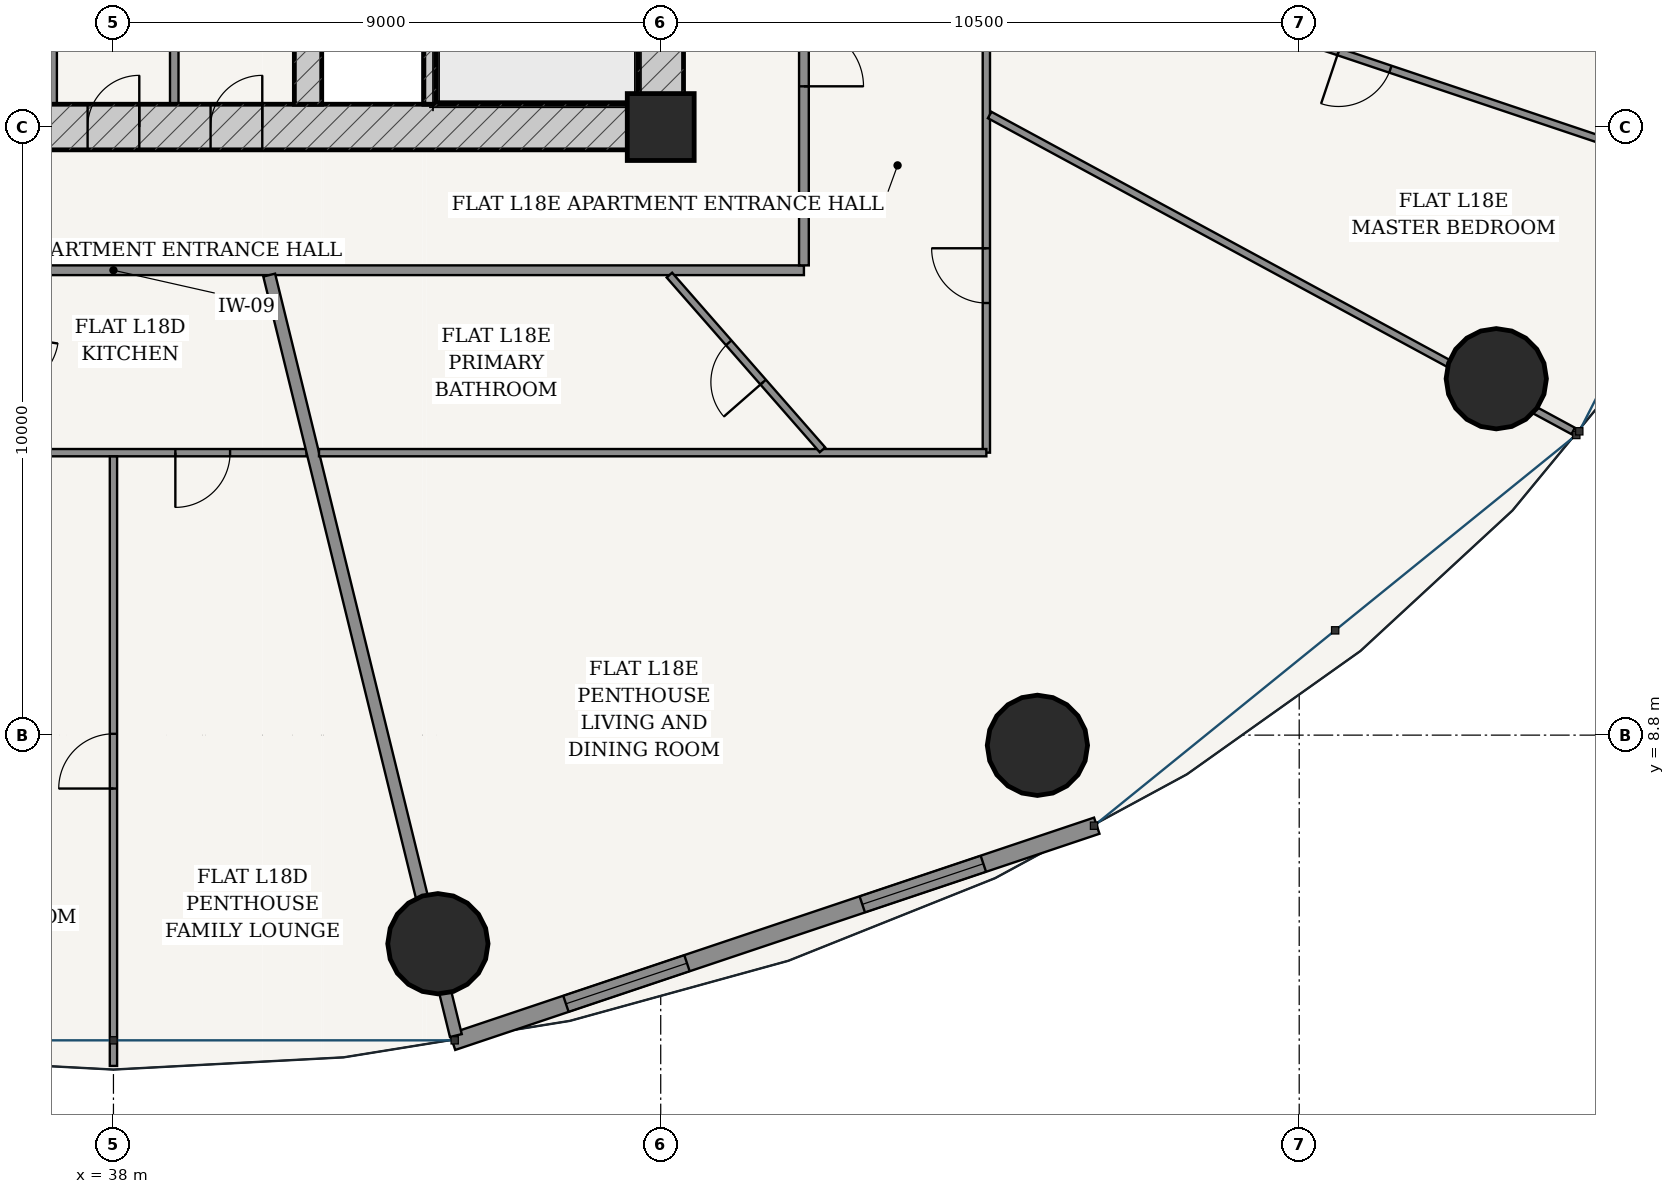
"""IFC4 building model, lengths in metres.
Left out: names, types, materials, properties, quantities, classifications, styles, units other than length and angle.
Written with IfcOpenShell. Run it as: python <this file> out.ifc"""

import sys

from ifc_helpers import new_model, si_unit, direction, frame, frame_2d, origin, origin_2d, place, context, subcontext, project, spatial, rectangle, hollow_circle, extrude, source, transform, mapped, element, fill, save


model = new_model("IFC4")
c1 = context("Model", 3, precision=1e-05, world=origin(), true_north=direction((-0.2419218956, 0.970295726276)))
c2 = subcontext(c1, "Body", "Model", "MODEL_VIEW")
j1 = project(units=[si_unit("LENGTHUNIT", "METRE"), si_unit("PLANEANGLEUNIT", "RADIAN")], contexts=[c1])
p1 = place(None, origin())
s1 = spatial("IfcSite", under=j1, at=p1, CompositionType="ELEMENT")
p2 = place(p1, origin())
s2 = spatial("IfcBuilding", under=s1, at=p2, CompositionType="ELEMENT")
p3 = place(p2, frame((0.0, 0.0, 70.8)))
s3 = spatial("IfcBuildingStorey", under=s2, at=p3, CompositionType="ELEMENT", Elevation=70.8)
p4 = place(p3, frame((47.0, 18.8, 0.0), z_axis=(0.0, 0.0, 1.0), x_axis=(1.0, 0.0, 0.0)))
e1 = element("IfcColumn", 1, at=p4, inside=s3, PredefinedType="COLUMN", context=c2, shape_type="SweptSolid", body=[
    extrude(rectangle(XDim=1.1, YDim=1.1, at=origin_2d()), origin(), (0.0, 0.0, 1.0), 3.6),
])
p5 = place(p3, frame((28.625, 18.8, 0.0), z_axis=(0.0, 0.0, 1.0), x_axis=(1.0, 0.0, 0.0)))
e2 = element("IfcWall", 2, at=p5, inside=s3, PredefinedType="SHEAR", context=c2, shape_type="SweptSolid", body=[
    extrude(rectangle(XDim=18.75, YDim=0.75, at=frame_2d((9.375, 0.0))), origin(), (0.0, 0.0, 1.0), 3.15),
])
p6 = place(p5, frame((6.927, 0.0, 0.0)))
e3 = element("IfcOpeningElement", 3, at=p6, cuts=e2, PredefinedType="OPENING", context=c2, shape_type="SweptSolid", body=[
    extrude(rectangle(XDim=0.85, YDim=2.1, at=frame_2d((0.425, 1.05))), frame((0.0, 0.385, 0.0), z_axis=(0.0, -1.0, 0.0), x_axis=(1.0, 0.0, 0.0)), (0.0, 0.0, 1.0), 0.77),
])
p7 = place(p5, frame((8.95, 0.0, 0.0)))
e4 = element("IfcOpeningElement", 4, at=p7, cuts=e2, PredefinedType="OPENING", context=c2, shape_type="SweptSolid", body=[
    extrude(rectangle(XDim=0.85, YDim=2.1, at=frame_2d((0.425, 1.05))), frame((0.0, 0.385, 0.0), z_axis=(0.0, -1.0, 0.0), x_axis=(1.0, 0.0, 0.0)), (0.0, 0.0, 1.0), 0.77),
])
p8 = place(p5, frame((10.972, 0.0, 0.0)))
e5 = element("IfcOpeningElement", 5, at=p8, cuts=e2, PredefinedType="OPENING", context=c2, shape_type="SweptSolid", body=[
    extrude(rectangle(XDim=0.85, YDim=2.1, at=frame_2d((0.425, 1.05))), frame((0.0, 0.385, 0.0), z_axis=(0.0, -1.0, 0.0), x_axis=(1.0, 0.0, 0.0)), (0.0, 0.0, 1.0), 0.77),
])
p9 = place(p3, frame((47.0, 19.175, 0.0), z_axis=(0.0, 0.0, 1.0), x_axis=(0.0, 1.0, 0.0)))
e6 = element("IfcWall", 6, at=p9, inside=s3, PredefinedType="SHEAR", context=c2, shape_type="SweptSolid", body=[
    extrude(rectangle(XDim=15.25, YDim=0.75, at=frame_2d((7.625, 0.0))), origin(), (0.0, 0.0, 1.0), 3.15),
])
p10 = place(p9, frame((9.875, 0.0, 0.0)))
e7 = element("IfcOpeningElement", 7, at=p10, cuts=e6, PredefinedType="OPENING", context=c2, shape_type="SweptSolid", body=[
    extrude(rectangle(XDim=1.5, YDim=2.2, at=frame_2d((0.75, 1.1))), frame((0.0, 0.385, 0.0), z_axis=(0.0, -1.0, 0.0), x_axis=(1.0, 0.0, 0.0)), (0.0, 0.0, 1.0), 0.77),
])
p11 = place(p3, frame((43.205, 19.175, 0.0), z_axis=(0.0, 0.0, 1.0), x_axis=(0.0, 1.0, 0.0)))
e8 = element("IfcWall", 8, at=p11, inside=s3, PredefinedType="SOLIDWALL", context=c2, shape_type="SweptSolid", body=[
    extrude(rectangle(XDim=7.375, YDim=0.2, at=frame_2d((3.688, 0.0))), origin(), (0.0, 0.0, 1.0), 3.15),
])
p12 = place(p3, frame((41.2, 19.175, 0.0), z_axis=(0.0, 0.0, 1.0), x_axis=(0.0, 1.0, 0.0)))
e9 = element("IfcWall", 9, at=p12, inside=s3, PredefinedType="SHEAR", context=c2, shape_type="SweptSolid", body=[
    extrude(rectangle(XDim=15.25, YDim=0.45, at=frame_2d((7.625, 0.0))), origin(), (0.0, 0.0, 1.0), 3.15),
])
p13 = place(p12, frame((7.8, 0.0, 0.0)))
e10 = element("IfcOpeningElement", 10, at=p13, cuts=e9, PredefinedType="OPENING", context=c2, shape_type="SweptSolid", body=[
    extrude(rectangle(XDim=1.05, YDim=2.15, at=frame_2d((0.525, 1.075))), frame((0.0, 0.235, 0.0), z_axis=(0.0, -1.0, 0.0), x_axis=(1.0, 0.0, 0.0)), (0.0, 0.0, 1.0), 0.47),
])
for number, where, z_axis, x_axis in (
    (11, (43.336, 5.37, 0.0), (0.0, 0.0, 1.0), (1.0, 0.0, 0.0)),
    (12, (53.195, 8.632, 0.0), (0.0, 0.0, 1.0), (1.0, 0.0, 0.0)),
    (13, (60.741, 14.661, 0.0), (0.0, 0.0, 1.0), (1.0, 0.0, 0.0)),
):
    element("IfcColumn", number, at=place(p3, frame(where, z_axis=z_axis, x_axis=x_axis)), inside=s3, PredefinedType="COLUMN", context=c2, shape_type="SweptSolid", body=[
        extrude(hollow_circle(Radius=0.825, WallThickness=0.05, at=origin_2d()), origin(), (0.0, 0.0, 1.0), 3.6),
    ])
p14 = place(p3, frame((43.576, 3.756, 0.0), z_axis=(0.0, 0.0, 1.0), x_axis=(0.948047847546, 0.31812777113, 0.0)))
e14 = element("IfcWall", 14, at=p14, inside=s3, PredefinedType="SOLIDWALL", context=c2, shape_type="SweptSolid", body=[
    extrude(rectangle(XDim=11.175, YDim=0.28, at=frame_2d((5.588, 0.0))), origin(), (0.0, 0.0, 1.0), 3.15),
])
p15 = place(p14, frame((1.967, 0.0, 0.85)))
e15 = element("IfcOpeningElement", 15, at=p15, cuts=e14, PredefinedType="OPENING", context=c2, shape_type="SweptSolid", body=[
    extrude(rectangle(XDim=2.1, YDim=1.95, at=frame_2d((1.05, 0.975))), frame((0.0, 0.15, 0.0), z_axis=(0.0, -1.0, 0.0), x_axis=(1.0, 0.0, 0.0)), (0.0, 0.0, 1.0), 0.3),
])
p16 = place(p14, frame((7.108, 0.0, 0.85)))
e16 = element("IfcOpeningElement", 16, at=p16, cuts=e14, PredefinedType="OPENING", context=c2, shape_type="SweptSolid", body=[
    extrude(rectangle(XDim=2.1, YDim=1.95, at=frame_2d((1.05, 0.975))), frame((0.0, 0.15, 0.0), z_axis=(0.0, -1.0, 0.0), x_axis=(1.0, 0.0, 0.0)), (0.0, 0.0, 1.0), 0.3),
])
p17 = place(p3, frame((37.0, 19.175, 0.0), z_axis=(0.0, 0.0, 1.0), x_axis=(0.0, 1.0, 0.0)))
e17 = element("IfcWall", 17, at=p17, inside=s3, PredefinedType="PARTITIONING", context=c2, shape_type="SweptSolid", body=[
    extrude(rectangle(XDim=4.465, YDim=0.14, at=frame_2d((2.232, 0.0))), origin(), (0.0, 0.0, 1.0), 3.15),
])
p18 = place(p17, frame((1.808, 0.0, 0.0)))
e18 = element("IfcOpeningElement", 18, at=p18, cuts=e17, PredefinedType="OPENING", context=c2, shape_type="SweptSolid", body=[
    extrude(rectangle(XDim=0.85, YDim=2.1, at=frame_2d((0.425, 1.05))), frame((0.0, 0.08, 0.0), z_axis=(0.0, -1.0, 0.0), x_axis=(1.0, 0.0, 0.0)), (0.0, 0.0, 1.0), 0.16),
])
p19 = place(p3, frame((39.0, 19.175, 0.0), z_axis=(0.0, 0.0, 1.0), x_axis=(0.0, 1.0, 0.0)))
e19 = element("IfcWall", 19, at=p19, inside=s3, PredefinedType="PARTITIONING", context=c2, shape_type="SweptSolid", body=[
    extrude(rectangle(XDim=4.465, YDim=0.14, at=frame_2d((2.232, 0.0))), origin(), (0.0, 0.0, 1.0), 3.15),
])
p20 = place(p19, frame((1.808, 0.0, 0.0)))
e20 = element("IfcOpeningElement", 20, at=p20, cuts=e19, PredefinedType="OPENING", context=c2, shape_type="SweptSolid", body=[
    extrude(rectangle(XDim=0.85, YDim=2.1, at=frame_2d((0.425, 1.05))), frame((0.0, 0.08, 0.0), z_axis=(0.0, -1.0, 0.0), x_axis=(1.0, 0.0, 0.0)), (0.0, 0.0, 1.0), 0.16),
])
p21 = place(p3, frame((26.645, 16.445, 0.0), z_axis=(0.0, 0.0, 1.0), x_axis=(1.0, 0.0, 0.0)))
e21 = element("IfcWall", 21, at=p21, inside=s3, PredefinedType="PARTITIONING", context=c2, shape_type="SweptSolid", body=[
    extrude(rectangle(XDim=22.71, YDim=0.16, at=frame_2d((11.355, 0.0))), origin(), (0.0, 0.0, 1.0), 2.596),
])
p22 = place(p21, frame((5.419, 0.0, 0.0)))
e22 = element("IfcOpeningElement", 22, at=p22, cuts=e21, PredefinedType="OPENING", context=c2, shape_type="SweptSolid", body=[
    extrude(rectangle(XDim=0.98, YDim=2.2, at=frame_2d((0.49, 1.1))), frame((0.0, 0.09, 0.0), z_axis=(0.0, -1.0, 0.0), x_axis=(1.0, 0.0, 0.0)), (0.0, 0.0, 1.0), 0.18),
])
p23 = place(p3, frame((49.355, 16.525, 0.0), z_axis=(0.0, 0.0, 1.0), x_axis=(0.0, 1.0, 0.0)))
e23 = element("IfcWall", 23, at=p23, inside=s3, PredefinedType="PARTITIONING", context=c2, shape_type="SweptSolid", body=[
    extrude(rectangle(XDim=20.55, YDim=0.16, at=frame_2d((10.275, 0.0))), origin(), (0.0, 0.0, 1.0), 2.596),
])
p24 = place(p23, frame((16.537, 0.0, 0.0)))
e24 = element("IfcOpeningElement", 24, at=p24, cuts=e23, PredefinedType="OPENING", context=c2, shape_type="SweptSolid", body=[
    extrude(rectangle(XDim=0.98, YDim=2.2, at=frame_2d((0.49, 1.1))), frame((0.0, 0.09, 0.0), z_axis=(0.0, -1.0, 0.0), x_axis=(1.0, 0.0, 0.0)), (0.0, 0.0, 1.0), 0.18),
])
p25 = place(p23, frame((2.945, 0.0, 0.0)))
e25 = element("IfcOpeningElement", 25, at=p25, cuts=e23, PredefinedType="OPENING", context=c2, shape_type="SweptSolid", body=[
    extrude(rectangle(XDim=0.98, YDim=2.2, at=frame_2d((0.49, 1.1))), frame((0.0, 0.09, 0.0), z_axis=(0.0, -1.0, 0.0), x_axis=(1.0, 0.0, 0.0)), (0.0, 0.0, 1.0), 0.18),
])
p26 = place(p3, frame((41.176, 13.445, 0.0), z_axis=(0.0, 0.0, 1.0), x_axis=(-1.0, 0.0, 0.0)))
e26 = element("IfcWall", 26, at=p26, inside=s3, PredefinedType="PARTITIONING", context=c2, shape_type="SweptSolid", body=[
    extrude(rectangle(XDim=17.531, YDim=0.12, at=frame_2d((8.766, 0.0))), origin(), (0.0, 0.0, 1.0), 2.596),
])
p27 = place(p26, frame((10.299, 0.0, 0.0)))
e27 = element("IfcOpeningElement", 27, at=p27, cuts=e26, PredefinedType="OPENING", context=c2, shape_type="SweptSolid", body=[
    extrude(rectangle(XDim=0.9, YDim=2.15, at=frame_2d((0.45, 1.075))), frame((0.0, 0.07, 0.0), z_axis=(0.0, -1.0, 0.0), x_axis=(1.0, 0.0, 0.0)), (0.0, 0.0, 1.0), 0.14),
])
p28 = place(p26, frame((1.258, 0.0, 0.0)))
e28 = element("IfcOpeningElement", 28, at=p28, cuts=e26, PredefinedType="OPENING", context=c2, shape_type="SweptSolid", body=[
    extrude(rectangle(XDim=0.9, YDim=2.15, at=frame_2d((0.45, 1.075))), frame((0.0, 0.07, 0.0), z_axis=(0.0, -1.0, 0.0), x_axis=(1.0, 0.0, 0.0)), (0.0, 0.0, 1.0), 0.14),
])
p29 = place(p3, frame((38.0, 13.383, 0.0), z_axis=(0.0, 0.0, 1.0), x_axis=(0.0, -1.0, 0.0)))
e29 = element("IfcWall", 29, at=p29, inside=s3, PredefinedType="PARTITIONING", context=c2, shape_type="SweptSolid", body=[
    extrude(rectangle(XDim=10.023, YDim=0.12, at=frame_2d((5.011, 0.0))), origin(), (0.0, 0.0, 1.0), 2.666),
])
p30 = place(p29, frame((4.562, 0.0, 0.0)))
e30 = element("IfcOpeningElement", 30, at=p30, cuts=e29, PredefinedType="OPENING", context=c2, shape_type="SweptSolid", body=[
    extrude(rectangle(XDim=0.9, YDim=2.15, at=frame_2d((0.45, 1.075))), frame((0.0, 0.07, 0.0), z_axis=(0.0, -1.0, 0.0), x_axis=(1.0, 0.0, 0.0)), (0.0, 0.0, 1.0), 0.14),
])
p31 = place(p3, frame((40.562, 16.365, 0.0), z_axis=(0.0, 0.0, 1.0), x_axis=(0.238380116209, -0.971171931326, 0.0)))
e31 = element("IfcWall", 31, at=p31, inside=s3, PredefinedType="PARTITIONING", context=c2, shape_type="SweptSolid", body=[
    extrude(rectangle(XDim=12.877, YDim=0.2, at=frame_2d((6.438, 0.0))), origin(), (0.0, 0.0, 1.0), 2.5),
])
p32 = place(p3, frame((52.355, 26.698, 0.0), z_axis=(0.0, 0.0, 1.0), x_axis=(0.0, -1.0, 0.0)))
e32 = element("IfcWall", 32, at=p32, inside=s3, PredefinedType="PARTITIONING", context=c2, shape_type="SweptSolid", body=[
    extrude(rectangle(XDim=13.253, YDim=0.12, at=frame_2d((6.626, 0.0))), origin(), (0.0, 0.0, 1.0), 2.596),
])
p33 = place(p32, frame((9.892, 0.0, 0.0)))
e33 = element("IfcOpeningElement", 33, at=p33, cuts=e32, PredefinedType="OPENING", context=c2, shape_type="SweptSolid", body=[
    extrude(rectangle(XDim=0.9, YDim=2.15, at=frame_2d((0.45, 1.075))), frame((0.0, 0.07, 0.0), z_axis=(0.0, -1.0, 0.0), x_axis=(1.0, 0.0, 0.0)), (0.0, 0.0, 1.0), 0.14),
])
p34 = place(p32, frame((2.951, 0.0, 0.0)))
e34 = element("IfcOpeningElement", 34, at=p34, cuts=e32, PredefinedType="OPENING", context=c2, shape_type="SweptSolid", body=[
    extrude(rectangle(XDim=0.9, YDim=2.15, at=frame_2d((0.45, 1.075))), frame((0.0, 0.07, 0.0), z_axis=(0.0, -1.0, 0.0), x_axis=(1.0, 0.0, 0.0)), (0.0, 0.0, 1.0), 0.14),
])
p35 = place(p3, frame((52.355, 13.445, 0.0), z_axis=(0.0, 0.0, 1.0), x_axis=(-1.0, 0.0, 0.0)))
e35 = element("IfcWall", 35, at=p35, inside=s3, PredefinedType="PARTITIONING", context=c2, shape_type="SweptSolid", body=[
    extrude(rectangle(XDim=10.975, YDim=0.12, at=frame_2d((5.487, 0.0))), origin(), (0.0, 0.0, 1.0), 2.596),
])
p36 = place(p3, frame((52.409, 18.998, 0.0), z_axis=(0.0, 0.0, 1.0), x_axis=(0.879373936002, -0.476131789193, 0.0)))
e36 = element("IfcWall", 36, at=p36, inside=s3, PredefinedType="PARTITIONING", context=c2, shape_type="SweptSolid", body=[
    extrude(rectangle(XDim=10.913, YDim=0.12, at=frame_2d((5.456, 0.0))), origin(), (0.0, 0.0, 1.0), 2.5),
])
p37 = place(p3, frame((52.414, 21.962, 0.0), z_axis=(0.0, 0.0, 1.0), x_axis=(0.948021751459, -0.318205529118, 0.0)))
e37 = element("IfcWall", 37, at=p37, inside=s3, PredefinedType="PARTITIONING", context=c2, shape_type="SweptSolid", body=[
    extrude(rectangle(XDim=12.994, YDim=0.12, at=frame_2d((6.497, 0.0))), origin(), (0.0, 0.0, 1.0), 2.666),
])
p38 = place(p37, frame((6.047, 0.0, 0.0)))
e38 = element("IfcOpeningElement", 38, at=p38, cuts=e37, PredefinedType="OPENING", context=c2, shape_type="SweptSolid", body=[
    extrude(rectangle(XDim=0.9, YDim=2.15, at=frame_2d((0.45, 1.075))), frame((0.0, 0.07, 0.0), z_axis=(0.0, -1.0, 0.0), x_axis=(1.0, 0.0, 0.0)), (0.0, 0.0, 1.0), 0.14),
])
p39 = place(p3, frame((47.143, 16.365, 0.0), z_axis=(0.0, 0.0, 1.0), x_axis=(0.659015717138, -0.752129167474, 0.0)))
e39 = element("IfcWall", 39, at=p39, inside=s3, PredefinedType="PARTITIONING", context=c2, shape_type="SweptSolid", body=[
    extrude(rectangle(XDim=3.82, YDim=0.12, at=frame_2d((1.91, 0.0))), origin(), (0.0, 0.0, 1.0), 2.825),
])
p40 = place(p39, frame((1.48, 0.0, 0.0)))
e40 = element("IfcOpeningElement", 40, at=p40, cuts=e39, PredefinedType="OPENING", context=c2, shape_type="SweptSolid", body=[
    extrude(rectangle(XDim=0.86, YDim=2.15, at=frame_2d((0.43, 1.075))), frame((0.0, 0.07, 0.0), z_axis=(0.0, -1.0, 0.0), x_axis=(1.0, 0.0, 0.0)), (0.0, 0.0, 1.0), 0.14),
])
m1 = source(origin(), c2, "Body", "SweptSolid", [
    extrude(rectangle(XDim=2.1, YDim=1.95, at=frame_2d((1.05, 0.975))), frame((0.0, 0.03, 0.0), z_axis=(0.0, -1.0, 0.0), x_axis=(1.0, 0.0, 0.0)), (0.0, 0.0, 1.0), 0.06),
])
p41 = place(p15, origin())
e41 = element("IfcWindow", 41, at=p41, inside=s3, PartitioningType="SINGLE_PANEL", PredefinedType="WINDOW", context=c2, shape_type="MappedRepresentation", body=[
    mapped(m1, transform((0.0, 0.0, 0.0), scale=1.0)),
])
fill(e15, e41)
p42 = place(p16, origin())
e42 = element("IfcWindow", 42, at=p42, inside=s3, PartitioningType="SINGLE_PANEL", PredefinedType="WINDOW", context=c2, shape_type="MappedRepresentation", body=[
    mapped(m1, transform((0.0, 0.0, 0.0), scale=1.0)),
])
fill(e16, e42)
m2 = source(origin(), c2, "Body", "SweptSolid", [
    extrude(rectangle(XDim=0.85, YDim=2.1, at=frame_2d((0.425, 1.05))), frame((0.0, 0.025, 0.0), z_axis=(0.0, -1.0, 0.0), x_axis=(1.0, 0.0, 0.0)), (0.0, 0.0, 1.0), 0.05),
])
p43 = place(p7, origin())
e43 = element("IfcDoor", 43, at=p43, inside=s3, OperationType="SINGLE_SWING_RIGHT", PredefinedType="DOOR", context=c2, shape_type="MappedRepresentation", body=[
    mapped(m2, transform((0.0, 0.0, 0.0), scale=1.0)),
])
fill(e4, e43)
p44 = place(p8, origin())
e44 = element("IfcDoor", 44, at=p44, inside=s3, OperationType="SINGLE_SWING_RIGHT", PredefinedType="DOOR", context=c2, shape_type="MappedRepresentation", body=[
    mapped(m2, transform((0.0, 0.0, 0.0), scale=1.0)),
])
fill(e5, e44)
m3 = source(origin(), c2, "Body", "SweptSolid", [
    extrude(rectangle(XDim=0.9, YDim=2.15, at=frame_2d((0.45, 1.075))), frame((0.0, 0.025, 0.0), z_axis=(0.0, -1.0, 0.0), x_axis=(1.0, 0.0, 0.0)), (0.0, 0.0, 1.0), 0.05),
])
p45 = place(p28, origin())
e45 = element("IfcDoor", 45, at=p45, inside=s3, OperationType="SINGLE_SWING_RIGHT", PredefinedType="DOOR", context=c2, shape_type="MappedRepresentation", body=[
    mapped(m3, transform((0.0, 0.0, 0.0), scale=1.0)),
])
fill(e28, e45)
p46 = place(p30, frame((0.9, 0.0, 0.0), z_axis=(0.0, 0.0, 1.0), x_axis=(-1.0, 0.0, 0.0)))
e46 = element("IfcDoor", 46, at=p46, inside=s3, OperationType="SINGLE_SWING_LEFT", PredefinedType="DOOR", context=c2, shape_type="MappedRepresentation", body=[
    mapped(m3, transform((0.0, 0.0, 0.0), scale=1.0)),
])
fill(e30, e46)
m4 = source(origin(), c2, "Body", "SweptSolid", [
    extrude(rectangle(XDim=0.98, YDim=2.2, at=frame_2d((0.49, 1.1))), frame((0.0, 0.025, 0.0), z_axis=(0.0, -1.0, 0.0), x_axis=(1.0, 0.0, 0.0)), (0.0, 0.0, 1.0), 0.05),
])
p47 = place(p25, frame((0.98, 0.0, 0.0), z_axis=(0.0, 0.0, 1.0), x_axis=(-1.0, 0.0, 0.0)))
e47 = element("IfcDoor", 47, at=p47, inside=s3, OperationType="SINGLE_SWING_RIGHT", PredefinedType="DOOR", context=c2, shape_type="MappedRepresentation", body=[
    mapped(m4, transform((0.0, 0.0, 0.0), scale=1.0)),
])
fill(e25, e47)
m5 = source(origin(), c2, "Body", "SweptSolid", [
    extrude(rectangle(XDim=0.86, YDim=2.15, at=frame_2d((0.43, 1.075))), frame((0.0, 0.025, 0.0), z_axis=(0.0, -1.0, 0.0), x_axis=(1.0, 0.0, 0.0)), (0.0, 0.0, 1.0), 0.05),
])
p48 = place(p40, frame((0.86, 0.0, 0.0), z_axis=(0.0, 0.0, 1.0), x_axis=(-1.0, 0.0, 0.0)))
e48 = element("IfcDoor", 48, at=p48, inside=s3, OperationType="SINGLE_SWING_LEFT", PredefinedType="DOOR", context=c2, shape_type="MappedRepresentation", body=[
    mapped(m5, transform((0.0, 0.0, 0.0), scale=1.0)),
])
fill(e40, e48)
p49 = place(p33, frame((0.9, 0.0, 0.0), z_axis=(0.0, 0.0, 1.0), x_axis=(-1.0, 0.0, 0.0)))
e49 = element("IfcDoor", 49, at=p49, inside=s3, OperationType="SINGLE_SWING_RIGHT", PredefinedType="DOOR", context=c2, shape_type="MappedRepresentation", body=[
    mapped(m3, transform((0.0, 0.0, 0.0), scale=1.0)),
])
fill(e33, e49)
p50 = place(p38, frame((0.9, 0.0, 0.0), z_axis=(0.0, 0.0, 1.0), x_axis=(-1.0, 0.0, 0.0)))
e50 = element("IfcDoor", 50, at=p50, inside=s3, OperationType="SINGLE_SWING_RIGHT", PredefinedType="DOOR", context=c2, shape_type="MappedRepresentation", body=[
    mapped(m3, transform((0.0, 0.0, 0.0), scale=1.0)),
])
fill(e38, e50)
save(model, sys.argv[1])
